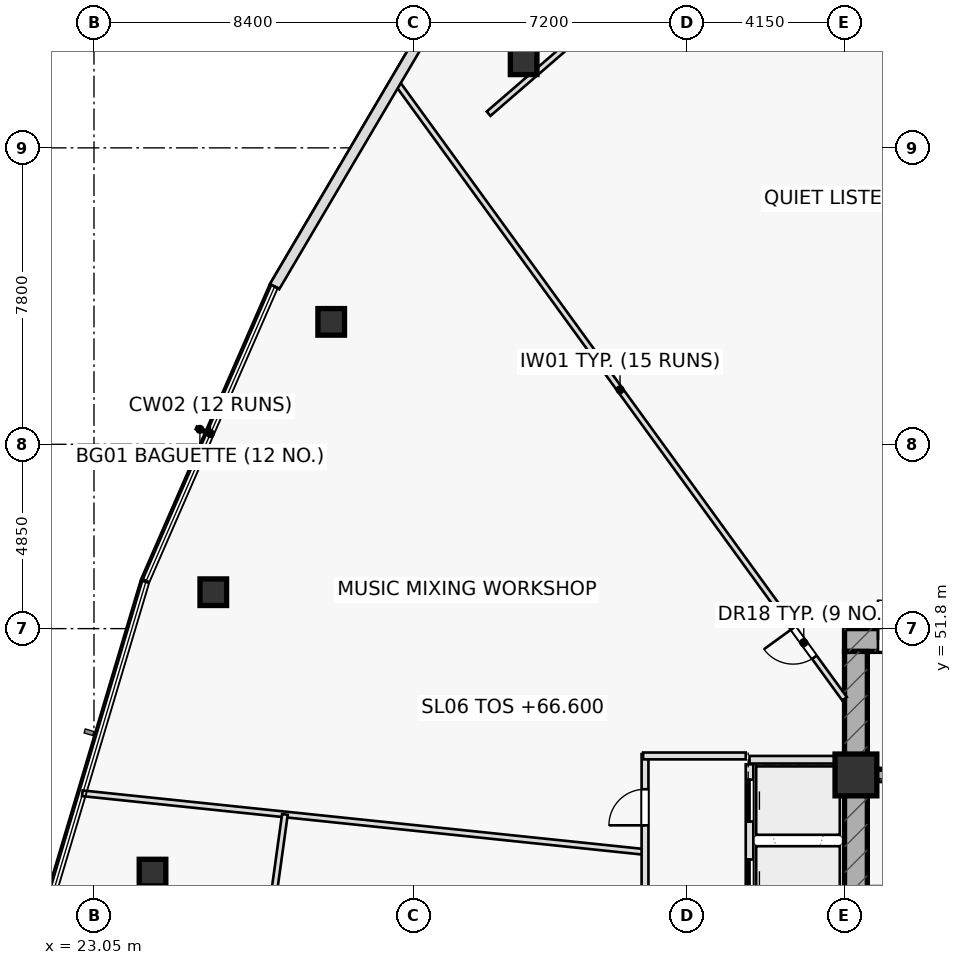
"""IFC4 building model, lengths in metres.
Left out: names, types, materials, properties, quantities, classifications, styles, units other than length and angle.
Written with IfcOpenShell. Run it as: python <this file> out.ifc"""

import sys

from ifc_helpers import new_model, si_unit, direction, frame, frame_2d, origin, origin_2d, place, context, subcontext, project, spatial, rectangle, hollow_rectangle, extrude, element, fill, save


model = new_model("IFC4")
c1 = context("Model", 3, precision=1e-05, world=origin(), true_north=direction((0.0, 1.0)))
c2 = subcontext(c1, "Body", "Model", "MODEL_VIEW")
j1 = project(units=[si_unit("LENGTHUNIT", "METRE"), si_unit("PLANEANGLEUNIT", "RADIAN")], contexts=[c1])
p1 = place(None, origin())
s1 = spatial("IfcSite", under=j1, at=p1, CompositionType="ELEMENT")
p2 = place(p1, origin())
s2 = spatial("IfcBuilding", under=s1, at=p2, CompositionType="ELEMENT")
p3 = place(p2, frame((0.0, 0.0, 66.6)))
s3 = spatial("IfcBuildingStorey", under=s2, at=p3, CompositionType="ELEMENT", Elevation=66.6)
p4 = place(p3, frame((42.8, 51.5, 0.0), z_axis=(0.0, 0.0, 1.0), x_axis=(1.0, 0.0, 0.0)))
e1 = element("IfcWall", 1, at=p4, inside=s3, PredefinedType="SHEAR", context=c2, shape_type="SweptSolid", body=[
    extrude(rectangle(XDim=14.4, YDim=0.6, at=frame_2d((7.2, 0.0))), origin(), (0.0, 0.0, 1.0), 3.6),
])
p5 = place(p4, frame((0.88, 0.0, 0.0)))
e2 = element("IfcOpeningElement", 2, at=p5, cuts=e1, PredefinedType="OPENING", context=c2, shape_type="SweptSolid", body=[
    extrude(rectangle(XDim=1.05, YDim=2.2, at=frame_2d((0.525, 1.1))), frame((0.0, 0.31, 0.0), z_axis=(0.0, -1.0, 0.0), x_axis=(1.0, 0.0, 0.0)), (0.0, 0.0, 1.0), 0.62),
])
p6 = place(p3, frame((43.1, 38.8, 0.0), z_axis=(0.0, 0.0, 1.0), x_axis=(0.0, 1.0, 0.0)))
e3 = element("IfcWall", 3, at=p6, inside=s3, PredefinedType="SHEAR", context=c2, shape_type="SweptSolid", body=[
    extrude(rectangle(XDim=12.4, YDim=0.6, at=frame_2d((6.2, 0.0))), origin(), (0.0, 0.0, 1.0), 3.6),
])
p7 = place(p3, frame((43.4, 47.95, 0.0), z_axis=(0.0, 0.0, 1.0), x_axis=(1.0, 0.0, 0.0)))
e4 = element("IfcWall", 4, at=p7, inside=s3, PredefinedType="SHEAR", context=c2, shape_type="SweptSolid", body=[
    extrude(rectangle(XDim=13.2, YDim=0.3, at=frame_2d((6.6, 0.0))), origin(), (0.0, 0.0, 1.0), 3.6),
])
p8 = place(p7, frame((8.345, 0.0, 0.0)))
e5 = element("IfcOpeningElement", 5, at=p8, cuts=e4, PredefinedType="OPENING", context=c2, shape_type="SweptSolid", body=[
    extrude(rectangle(XDim=1.15, YDim=2.2, at=frame_2d((0.575, 1.1))), frame((0.0, 0.16, 0.0), z_axis=(0.0, -1.0, 0.0), x_axis=(1.0, 0.0, 0.0)), (0.0, 0.0, 1.0), 0.32),
])
p9 = place(p7, frame((10.065, 0.0, 0.0)))
e6 = element("IfcOpeningElement", 6, at=p9, cuts=e4, PredefinedType="OPENING", context=c2, shape_type="SweptSolid", body=[
    extrude(rectangle(XDim=1.15, YDim=2.2, at=frame_2d((0.575, 1.1))), frame((0.0, 0.16, 0.0), z_axis=(0.0, -1.0, 0.0), x_axis=(1.0, 0.0, 0.0)), (0.0, 0.0, 1.0), 0.32),
])
p10 = place(p7, frame((11.645, 0.0, 0.0)))
e7 = element("IfcOpeningElement", 7, at=p10, cuts=e4, PredefinedType="OPENING", context=c2, shape_type="SweptSolid", body=[
    extrude(rectangle(XDim=1.15, YDim=2.2, at=frame_2d((0.575, 1.1))), frame((0.0, 0.16, 0.0), z_axis=(0.0, -1.0, 0.0), x_axis=(1.0, 0.0, 0.0)), (0.0, 0.0, 1.0), 0.32),
])
p11 = place(p3, frame((43.1, 47.95, 0.0), z_axis=(0.0, 0.0, 1.0), x_axis=(1.0, 0.0, 0.0)))
e8 = element("IfcColumn", 8, at=p11, inside=s3, PredefinedType="COLUMN", context=c2, shape_type="SweptSolid", body=[
    extrude(rectangle(XDim=1.1, YDim=1.1, at=origin_2d()), origin(), (0.0, 0.0, 1.0), 3.6),
])
for number, where, z_axis, x_axis in (
    (9, (34.356, 66.728, 0.0), (0.0, 0.0, 1.0), (1.0, 0.0, 0.0)),
    (10, (29.292, 59.872, 0.0), (0.0, 0.0, 1.0), (1.0, 0.0, 0.0)),
    (11, (26.189, 52.758, 0.0), (0.0, 0.0, 1.0), (1.0, 0.0, 0.0)),
    (12, (24.59, 45.381, 0.0), (0.0, 0.0, 1.0), (1.0, 0.0, 0.0)),
):
    element("IfcColumn", number, at=place(p3, frame(where, z_axis=z_axis, x_axis=x_axis)), inside=s3, PredefinedType="COLUMN", context=c2, shape_type="SweptSolid", body=[
        extrude(hollow_rectangle(XDim=0.7, YDim=0.7, WallThickness=0.04, at=origin_2d()), origin(), (0.0, 0.0, 1.0), 3.6),
    ])
p12 = place(p3, frame((40.3, 48.35, 0.0), z_axis=(0.0, 0.0, 1.0), x_axis=(1.0, 0.0, 0.0)))
e13 = element("IfcWall", 13, at=p12, inside=s3, PredefinedType="PARTITIONING", context=c2, shape_type="SweptSolid", body=[
    extrude(rectangle(XDim=2.5, YDim=0.2, at=frame_2d((1.25, 0.0))), origin(), (0.0, 0.0, 1.0), 3.6),
])
p13 = place(p3, frame((43.421, 73.979, 0.0), z_axis=(0.0, 0.0, 1.0), x_axis=(-0.756659135409, -0.653809569218, 0.0)))
e14 = element("IfcWall", 14, at=p13, inside=s3, PredefinedType="PARTITIONING", context=c2, shape_type="SweptSolid", body=[
    extrude(rectangle(XDim=13.2, YDim=0.15, at=frame_2d((6.6, 0.0))), origin(), (0.0, 0.0, 1.0), 2.975),
])
p14 = place(p3, frame((42.8, 49.955, 0.0), z_axis=(0.0, 0.0, 1.0), x_axis=(-0.587794647475, 0.809010168292, 0.0)))
e15 = element("IfcWall", 15, at=p14, inside=s3, PredefinedType="PARTITIONING", context=c2, shape_type="SweptSolid", body=[
    extrude(rectangle(XDim=20.1, YDim=0.15, at=frame_2d((10.05, 0.0))), origin(), (0.0, 0.0, 1.0), 2.975),
])
p15 = place(p14, frame((1.35, 0.0, 0.0)))
e16 = element("IfcOpeningElement", 16, at=p15, cuts=e15, PredefinedType="OPENING", context=c2, shape_type="SweptSolid", body=[
    extrude(rectangle(XDim=0.95, YDim=2.05, at=frame_2d((0.475, 1.025))), frame((0.0, 0.085, 0.0), z_axis=(0.0, -1.0, 0.0), x_axis=(1.0, 0.0, 0.0)), (0.0, 0.0, 1.0), 0.17),
])
p16 = place(p3, frame((37.55, 45.923, 0.0), z_axis=(0.0, 0.0, 1.0), x_axis=(-0.994605726754, 0.103727760548, 0.0)))
e17 = element("IfcWall", 17, at=p16, inside=s3, PredefinedType="PARTITIONING", context=c2, shape_type="SweptSolid", body=[
    extrude(rectangle(XDim=14.887, YDim=0.15, at=frame_2d((7.443, 0.0))), origin(), (0.0, 0.0, 1.0), 2.975),
])
p17 = place(p3, frame((28.074, 46.911, 0.0), z_axis=(0.0, 0.0, 1.0), x_axis=(-0.137197100967, -0.990543767577, 0.0)))
e18 = element("IfcWall", 18, at=p17, inside=s3, PredefinedType="PARTITIONING", context=c2, shape_type="SweptSolid", body=[
    extrude(rectangle(XDim=10.878, YDim=0.15, at=frame_2d((5.439, 0.0))), origin(), (0.0, 0.0, 1.0), 2.975),
])
p18 = place(p17, frame((4.964, 0.0, 0.0)))
e19 = element("IfcOpeningElement", 19, at=p18, cuts=e18, PredefinedType="OPENING", context=c2, shape_type="SweptSolid", body=[
    extrude(rectangle(XDim=0.95, YDim=2.05, at=frame_2d((0.475, 1.025))), frame((0.0, 0.085, 0.0), z_axis=(0.0, -1.0, 0.0), x_axis=(1.0, 0.0, 0.0)), (0.0, 0.0, 1.0), 0.17),
])
p19 = place(p3, frame((37.55, 35.85, 0.0), z_axis=(0.0, 0.0, 1.0), x_axis=(0.0, 1.0, 0.0)))
e20 = element("IfcWall", 20, at=p19, inside=s3, PredefinedType="PARTITIONING", context=c2, shape_type="SweptSolid", body=[
    extrude(rectangle(XDim=12.65, YDim=0.18, at=frame_2d((6.325, 0.0))), origin(), (0.0, 0.0, 1.0), 2.975),
])
p20 = place(p19, frame((2.211, 0.0, 0.0)))
e21 = element("IfcOpeningElement", 21, at=p20, cuts=e20, PredefinedType="OPENING", context=c2, shape_type="SweptSolid", body=[
    extrude(rectangle(XDim=0.95, YDim=2.05, at=frame_2d((0.475, 1.025))), frame((0.0, 0.1, 0.0), z_axis=(0.0, -1.0, 0.0), x_axis=(1.0, 0.0, 0.0)), (0.0, 0.0, 1.0), 0.2),
])
p21 = place(p19, frame((7.143, 0.0, 0.0)))
e22 = element("IfcOpeningElement", 22, at=p21, cuts=e20, PredefinedType="OPENING", context=c2, shape_type="SweptSolid", body=[
    extrude(rectangle(XDim=0.95, YDim=2.05, at=frame_2d((0.475, 1.025))), frame((0.0, 0.1, 0.0), z_axis=(0.0, -1.0, 0.0), x_axis=(1.0, 0.0, 0.0)), (0.0, 0.0, 1.0), 0.2),
])
p22 = place(p19, frame((10.774, 0.0, 0.0)))
e23 = element("IfcOpeningElement", 23, at=p22, cuts=e20, PredefinedType="OPENING", context=c2, shape_type="SweptSolid", body=[
    extrude(rectangle(XDim=0.95, YDim=2.05, at=frame_2d((0.475, 1.025))), frame((0.0, 0.1, 0.0), z_axis=(0.0, -1.0, 0.0), x_axis=(1.0, 0.0, 0.0)), (0.0, 0.0, 1.0), 0.2),
])
p23 = place(p3, frame((37.5, 48.45, 0.0), z_axis=(0.0, 0.0, 1.0), x_axis=(1.0, 0.0, 0.0)))
e24 = element("IfcWall", 24, at=p23, inside=s3, PredefinedType="PARTITIONING", context=c2, shape_type="SweptSolid", body=[
    extrude(rectangle(XDim=2.7, YDim=0.18, at=frame_2d((1.35, 0.0))), origin(), (0.0, 0.0, 1.0), 3.6),
])
p24 = place(p3, frame((32.112, 68.108, 0.0), z_axis=(0.0, 0.0, 1.0), x_axis=(-0.50795162741, -0.861385595544, 0.0)))
e25 = element("IfcWall", 25, at=p24, inside=s3, PredefinedType="STANDARD", context=c2, shape_type="SweptSolid", body=[
    extrude(rectangle(XDim=8.485, YDim=0.28, at=frame_2d((4.242, 0.0))), origin(), (0.0, 0.0, 1.0), 3.6),
])
p25 = place(p3, frame((40.3, 40.02, 0.0), z_axis=(0.0, 0.0, 1.0), x_axis=(0.0, 1.0, 0.0)))
e26 = element("IfcWall", 26, at=p25, inside=s3, PredefinedType="PARTITIONING", context=c2, shape_type="SweptSolid", body=[
    extrude(rectangle(XDim=8.21, YDim=0.2, at=frame_2d((4.105, 0.0))), origin(), (0.0, 0.0, 1.0), 3.6),
])
p26 = place(p25, frame((0.405, 0.0, 0.0)))
e27 = element("IfcOpeningElement", 27, at=p26, cuts=e26, PredefinedType="OPENING", context=c2, shape_type="SweptSolid", body=[
    extrude(rectangle(XDim=1.1, YDim=2.15, at=frame_2d((0.55, 1.075))), frame((0.0, 0.11, 0.0), z_axis=(0.0, -1.0, 0.0), x_axis=(1.0, 0.0, 0.0)), (0.0, 0.0, 1.0), 0.22),
])
p27 = place(p25, frame((2.505, 0.0, 0.0)))
e28 = element("IfcOpeningElement", 28, at=p27, cuts=e26, PredefinedType="OPENING", context=c2, shape_type="SweptSolid", body=[
    extrude(rectangle(XDim=1.1, YDim=2.15, at=frame_2d((0.55, 1.075))), frame((0.0, 0.11, 0.0), z_axis=(0.0, -1.0, 0.0), x_axis=(1.0, 0.0, 0.0)), (0.0, 0.0, 1.0), 0.22),
])
p28 = place(p25, frame((4.605, 0.0, 0.0)))
e29 = element("IfcOpeningElement", 29, at=p28, cuts=e26, PredefinedType="OPENING", context=c2, shape_type="SweptSolid", body=[
    extrude(rectangle(XDim=1.1, YDim=2.15, at=frame_2d((0.55, 1.075))), frame((0.0, 0.11, 0.0), z_axis=(0.0, -1.0, 0.0), x_axis=(1.0, 0.0, 0.0)), (0.0, 0.0, 1.0), 0.22),
])
p29 = place(p25, frame((6.705, 0.0, 0.0)))
e30 = element("IfcOpeningElement", 30, at=p29, cuts=e26, PredefinedType="OPENING", context=c2, shape_type="SweptSolid", body=[
    extrude(rectangle(XDim=1.1, YDim=2.15, at=frame_2d((0.55, 1.075))), frame((0.0, 0.11, 0.0), z_axis=(0.0, -1.0, 0.0), x_axis=(1.0, 0.0, 0.0)), (0.0, 0.0, 1.0), 0.22),
])
p30 = place(p5, origin())
e31 = element("IfcDoor", 31, at=p30, inside=s3, OperationType="SINGLE_SWING_LEFT", PredefinedType="DOOR", context=c2, shape_type="SweptSolid", body=[
    extrude(rectangle(XDim=1.05, YDim=2.2, at=frame_2d((0.525, 1.1))), frame((0.0, 0.025, 0.0), z_axis=(0.0, -1.0, 0.0), x_axis=(1.0, 0.0, 0.0)), (0.0, 0.0, 1.0), 0.05),
])
fill(e2, e31)
p31 = place(p15, origin())
e32 = element("IfcDoor", 32, at=p31, inside=s3, OperationType="SINGLE_SWING_RIGHT", PredefinedType="DOOR", context=c2, shape_type="SweptSolid", body=[
    extrude(rectangle(XDim=0.95, YDim=2.05, at=frame_2d((0.475, 1.025))), frame((0.0, 0.025, 0.0), z_axis=(0.0, -1.0, 0.0), x_axis=(1.0, 0.0, 0.0)), (0.0, 0.0, 1.0), 0.05),
])
fill(e16, e32)
p32 = place(p22, origin())
e33 = element("IfcDoor", 33, at=p32, inside=s3, OperationType="SINGLE_SWING_LEFT", PredefinedType="DOOR", context=c2, shape_type="SweptSolid", body=[
    extrude(rectangle(XDim=0.95, YDim=2.05, at=frame_2d((0.475, 1.025))), frame((0.0, 0.025, 0.0), z_axis=(0.0, -1.0, 0.0), x_axis=(1.0, 0.0, 0.0)), (0.0, 0.0, 1.0), 0.05),
])
fill(e23, e33)
p33 = place(p28, origin())
e34 = element("IfcDoor", 34, at=p33, inside=s3, OperationType="SLIDING_TO_LEFT", PredefinedType="DOOR", context=c2, shape_type="SweptSolid", body=[
    extrude(rectangle(XDim=1.1, YDim=2.15, at=frame_2d((0.55, 1.075))), frame((0.0, 0.025, 0.0), z_axis=(0.0, -1.0, 0.0), x_axis=(1.0, 0.0, 0.0)), (0.0, 0.0, 1.0), 0.05),
])
fill(e29, e34)
p34 = place(p29, origin())
e35 = element("IfcDoor", 35, at=p34, inside=s3, OperationType="SLIDING_TO_RIGHT", PredefinedType="DOOR", context=c2, shape_type="SweptSolid", body=[
    extrude(rectangle(XDim=1.1, YDim=2.15, at=frame_2d((0.55, 1.075))), frame((0.0, 0.025, 0.0), z_axis=(0.0, -1.0, 0.0), x_axis=(1.0, 0.0, 0.0)), (0.0, 0.0, 1.0), 0.05),
])
fill(e30, e35)
save(model, sys.argv[1])
